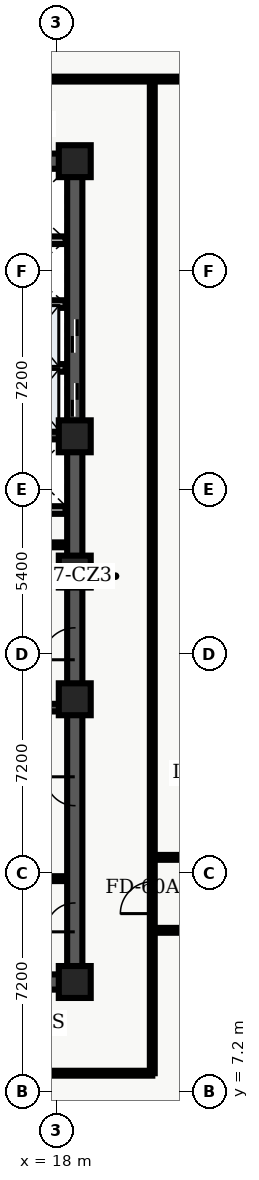
"""IFC4 building model, lengths in metres.
Left out: names, types, materials, properties, quantities, classifications, styles, units other than length and angle.
Written with IfcOpenShell. Run it as: python <this file> out.ifc"""

import sys

from ifc_helpers import new_model, entity, si_unit, converted_unit, direction, frame, origin_with_axes, origin_2d_with_axis, place, context, subcontext, project, spatial, polyline, rectangle, outline, extrude, element, fill, save


model = new_model("IFC4")
c1 = context("Model", 3, precision=1e-05, world=origin_with_axes(), true_north=direction((0.0, 1.0)))
c2 = subcontext(c1, "Body", "Model", "MODEL_VIEW")
j1 = project(units=[si_unit("LENGTHUNIT", "METRE"), converted_unit("PLANEANGLEUNIT", "DEGREE", entity("IfcPlaneAngleMeasure", 0.017), si_unit("PLANEANGLEUNIT", "RADIAN"), dimensions=[0, 0, 0, 0, 0, 0, 0])], contexts=[c1])
p1 = place(None, origin_with_axes())
s1 = spatial("IfcSite", under=j1, at=p1, CompositionType="ELEMENT")
p2 = place(p1, origin_with_axes())
s2 = spatial("IfcBuilding", under=s1, at=p2, CompositionType="ELEMENT")
p3 = place(p2, frame((0.0, 0.0, 152.4), z_axis=(0.0, 0.0, 1.0), x_axis=(1.0, 0.0, 0.0)))
s3 = spatial("IfcBuildingStorey", under=s2, at=p3, CompositionType="ELEMENT", Elevation=152.4)
p4 = place(p3, frame((11.4, 10.8, 0.0), z_axis=(0.0, 0.0, 1.0), x_axis=(1.0, 0.0, 0.0)))
e1 = element("IfcWall", 1, at=p4, inside=s3, PredefinedType="SHEAR", context=c2, shape_type="SweptSolid", body=[
    extrude(outline(polyline([(0.0, -0.25), (7.2, -0.25), (7.2, 0.25), (0.0, 0.25), (0.0, -0.25)])), origin_with_axes(), (0.0, 0.0, 1.0), 3.66),
])
p5 = place(p4, frame((2.625, 0.0, 0.0), z_axis=(0.0, 0.0, 1.0), x_axis=(1.0, 0.0, 0.0)))
e2 = element("IfcOpeningElement", 2, at=p5, cuts=e1, PredefinedType="OPENING", context=c2, shape_type="SweptSolid", body=[
    extrude(rectangle(XDim=1.05, YDim=0.52, at=origin_2d_with_axis()), origin_with_axes(), (0.0, 0.0, 1.0), 2.15),
])
p6 = place(p3, frame((11.4, 37.8, 0.0), z_axis=(0.0, 0.0, 1.0), x_axis=(1.0, 0.0, 0.0)))
e3 = element("IfcWall", 3, at=p6, inside=s3, PredefinedType="SHEAR", context=c2, shape_type="SweptSolid", body=[
    extrude(outline(polyline([(0.0, -0.25), (7.2, -0.25), (7.2, 0.25), (0.0, 0.25), (0.0, -0.25)])), origin_with_axes(), (0.0, 0.0, 1.0), 3.66),
])
p7 = place(p6, frame((2.625, 0.0, 0.0), z_axis=(0.0, 0.0, 1.0), x_axis=(1.0, 0.0, 0.0)))
e4 = element("IfcOpeningElement", 4, at=p7, cuts=e3, PredefinedType="OPENING", context=c2, shape_type="SweptSolid", body=[
    extrude(rectangle(XDim=1.05, YDim=0.52, at=origin_2d_with_axis()), origin_with_axes(), (0.0, 0.0, 1.0), 2.15),
])
p8 = place(p3, frame((18.6, 10.8, 0.0), z_axis=(0.0, 0.0, 1.0), x_axis=(0.0, 1.0, 0.0)))
e5 = element("IfcWall", 5, at=p8, inside=s3, PredefinedType="SHEAR", context=c2, shape_type="SweptSolid", body=[
    extrude(outline(polyline([(0.0, -0.25), (13.5, -0.25), (13.5, 0.25), (0.0, 0.25), (0.0, -0.25)])), origin_with_axes(), (0.0, 0.0, 1.0), 3.66),
])
p9 = place(p8, frame((11.125, 0.0, 0.0), z_axis=(0.0, 0.0, 1.0), x_axis=(1.0, 0.0, 0.0)))
e6 = element("IfcOpeningElement", 6, at=p9, cuts=e5, PredefinedType="OPENING", context=c2, shape_type="SweptSolid", body=[
    extrude(rectangle(XDim=1.05, YDim=0.52, at=origin_2d_with_axis()), origin_with_axes(), (0.0, 0.0, 1.0), 2.15),
])
p10 = place(p8, frame((2.125, 0.0, 0.0), z_axis=(0.0, 0.0, 1.0), x_axis=(1.0, 0.0, 0.0)))
e7 = element("IfcOpeningElement", 7, at=p10, cuts=e5, PredefinedType="OPENING", context=c2, shape_type="SweptSolid", body=[
    extrude(rectangle(XDim=0.95, YDim=0.52, at=origin_2d_with_axis()), origin_with_axes(), (0.0, 0.0, 1.0), 2.15),
])
p11 = place(p8, frame((6.275, 0.0, 0.0), z_axis=(0.0, 0.0, 1.0), x_axis=(1.0, 0.0, 0.0)))
e8 = element("IfcOpeningElement", 8, at=p11, cuts=e5, PredefinedType="OPENING", context=c2, shape_type="SweptSolid", body=[
    extrude(rectangle(XDim=0.95, YDim=0.52, at=origin_2d_with_axis()), origin_with_axes(), (0.0, 0.0, 1.0), 2.15),
])
p12 = place(p3, frame((18.6, 24.3, 0.0), z_axis=(0.0, 0.0, 1.0), x_axis=(0.0, 1.0, 0.0)))
e9 = element("IfcWall", 9, at=p12, inside=s3, PredefinedType="SHEAR", context=c2, shape_type="SweptSolid", body=[
    extrude(outline(polyline([(0.0, -0.25), (13.5, -0.25), (13.5, 0.25), (0.0, 0.25), (0.0, -0.25)])), origin_with_axes(), (0.0, 0.0, 1.0), 3.66),
])
p13 = place(p12, frame((5.65, 0.0, 0.0), z_axis=(0.0, 0.0, 1.0), x_axis=(1.0, 0.0, 0.0)))
e10 = element("IfcOpeningElement", 10, at=p13, cuts=e9, PredefinedType="OPENING", context=c2, shape_type="SweptSolid", body=[
    extrude(rectangle(XDim=1.1, YDim=0.52, at=origin_2d_with_axis()), origin_with_axes(), (0.0, 0.0, 1.0), 2.15),
])
p14 = place(p12, frame((7.75, 0.0, 0.0), z_axis=(0.0, 0.0, 1.0), x_axis=(1.0, 0.0, 0.0)))
e11 = element("IfcOpeningElement", 11, at=p14, cuts=e9, PredefinedType="OPENING", context=c2, shape_type="SweptSolid", body=[
    extrude(rectangle(XDim=1.1, YDim=0.52, at=origin_2d_with_axis()), origin_with_axes(), (0.0, 0.0, 1.0), 2.15),
])
for number, where, z_axis, x_axis in (
    (12, (11.65, 19.825, 0.0), (0.0, 0.0, 1.0), (1.0, 0.0, 0.0)),
    (13, (11.65, 28.775, 0.0), (0.0, 0.0, 1.0), (1.0, 0.0, 0.0)),
):
    element("IfcWall", number, at=place(p3, frame(where, z_axis=z_axis, x_axis=x_axis)), inside=s3, PredefinedType="SHEAR", context=c2, shape_type="SweptSolid", body=[
        extrude(outline(polyline([(0.0, -0.125), (6.7, -0.125), (6.7, 0.125), (0.0, 0.125), (0.0, -0.125)])), origin_with_axes(), (0.0, 0.0, 1.0), 3.66),
    ])
p15 = place(p3, frame((11.7, 24.1, 0.0), z_axis=(0.0, 0.0, 1.0), x_axis=(1.0, 0.0, 0.0)))
e14 = element("IfcWall", 14, at=p15, inside=s3, PredefinedType="SOLIDWALL", context=c2, shape_type="SweptSolid", body=[
    extrude(outline(polyline([(0.0, -0.125), (6.6, -0.125), (6.6, 0.125), (0.0, 0.125), (0.0, -0.125)])), origin_with_axes(), (0.0, 0.0, 1.0), 2.7),
])
p16 = place(p15, frame((3.75, 0.0, 0.0), z_axis=(0.0, 0.0, 1.0), x_axis=(1.0, 0.0, 0.0)))
e15 = element("IfcOpeningElement", 15, at=p16, cuts=e14, PredefinedType="OPENING", context=c2, shape_type="SweptSolid", body=[
    extrude(rectangle(XDim=0.9, YDim=0.27, at=origin_2d_with_axis()), origin_with_axes(), (0.0, 0.0, 1.0), 2.15),
])
p17 = place(p3, frame((11.7, 26.325, 0.0), z_axis=(0.0, 0.0, 1.0), x_axis=(1.0, 0.0, 0.0)))
e16 = element("IfcWall", 16, at=p17, inside=s3, PredefinedType="SOLIDWALL", context=c2, shape_type="SweptSolid", body=[
    extrude(outline(polyline([(0.0, -0.125), (6.6, -0.125), (6.6, 0.125), (0.0, 0.125), (0.0, -0.125)])), origin_with_axes(), (0.0, 0.0, 1.0), 2.7),
])
p18 = place(p17, frame((3.5, 0.0, 0.0), z_axis=(0.0, 0.0, 1.0), x_axis=(1.0, 0.0, 0.0)))
e17 = element("IfcOpeningElement", 17, at=p18, cuts=e16, PredefinedType="OPENING", context=c2, shape_type="SweptSolid", body=[
    extrude(rectangle(XDim=0.9, YDim=0.27, at=origin_2d_with_axis()), origin_with_axes(), (0.0, 0.0, 1.0), 2.15),
])
for number, where, z_axis, x_axis in (
    (18, (18.6, 10.8, 0.0), (0.0, 0.0, 1.0), (1.0, 0.0, 0.0)),
    (19, (18.6, 20.1, 0.0), (0.0, 0.0, 1.0), (1.0, 0.0, 0.0)),
    (20, (18.6, 24.3, 0.0), (0.0, 0.0, 1.0), (1.0, 0.0, 0.0)),
    (21, (18.6, 28.75, 0.0), (0.0, 0.0, 1.0), (1.0, 0.0, 0.0)),
    (22, (18.6, 37.8, 0.0), (0.0, 0.0, 1.0), (1.0, 0.0, 0.0)),
):
    element("IfcColumn", number, at=place(p3, frame(where, z_axis=z_axis, x_axis=x_axis)), inside=s3, PredefinedType="COLUMN", context=c2, shape_type="SweptSolid", body=[
        extrude(rectangle(XDim=1.05, YDim=1.05, at=origin_2d_with_axis()), origin_with_axes(), (0.0, 0.0, 1.0), 3.9),
    ])
p19 = place(p3, frame((14.62, 25.18, 0.0), z_axis=(0.0, 0.0, 1.0), x_axis=(1.0, 0.0, 0.0)))
e23 = element("IfcWall", 23, at=p19, inside=s3, PredefinedType="PARTITIONING", context=c2, shape_type="SweptSolid", body=[
    extrude(outline(polyline([(0.0, -0.08), (3.68, -0.08), (3.68, 0.08), (0.0, 0.08), (0.0, -0.08)])), origin_with_axes(), (0.0, 0.0, 1.0), 2.7),
])
p20 = place(p19, frame((1.95, 0.0, 0.0), z_axis=(0.0, 0.0, 1.0), x_axis=(1.0, 0.0, 0.0)))
e24 = element("IfcOpeningElement", 24, at=p20, cuts=e23, PredefinedType="OPENING", context=c2, shape_type="SweptSolid", body=[
    extrude(rectangle(XDim=0.9, YDim=0.18, at=origin_2d_with_axis()), origin_with_axes(), (0.0, 0.0, 1.0), 2.15),
])
p21 = place(p3, frame((15.84, 14.2, 0.0), z_axis=(0.0, 0.0, 1.0), x_axis=(1.0, 0.0, 0.0)))
e25 = element("IfcWall", 25, at=p21, inside=s3, PredefinedType="PARTITIONING", context=c2, shape_type="SweptSolid", body=[
    extrude(outline(polyline([(0.0, -0.08), (2.46, -0.08), (2.46, 0.08), (0.0, 0.08), (0.0, -0.08)])), origin_with_axes(), (0.0, 0.0, 1.0), 2.7),
])
for number, where, z_axis, x_axis in (
    (26, (15.84, 31.0, 0.0), (0.0, 0.0, 1.0), (1.0, 0.0, 0.0)),
    (27, (15.84, 33.1, 0.0), (0.0, 0.0, 1.0), (1.0, 0.0, 0.0)),
    (28, (15.84, 35.2, 0.0), (0.0, 0.0, 1.0), (1.0, 0.0, 0.0)),
):
    element("IfcWall", number, at=place(p3, frame(where, z_axis=z_axis, x_axis=x_axis)), inside=s3, PredefinedType="SOLIDWALL", context=c2, shape_type="SweptSolid", body=[
        extrude(outline(polyline([(0.0, -0.125), (2.46, -0.125), (2.46, 0.125), (0.0, 0.125), (0.0, -0.125)])), origin_with_axes(), (0.0, 0.0, 1.0), 2.7),
    ])
p22 = place(p3, frame((2.6, 7.8, 0.0), z_axis=(0.0, 0.0, 1.0), x_axis=(1.0, 0.0, 0.0)))
e29 = element("IfcWall", 29, at=p22, inside=s3, PredefinedType="PARTITIONING", context=c2, shape_type="SweptSolid", body=[
    extrude(outline(polyline([(0.0, -0.08), (18.55, -0.08), (18.55, 0.08), (0.0, 0.08), (0.0, -0.08)])), origin_with_axes(), (0.0, 0.0, 1.0), 2.7),
])
p23 = place(p22, frame((3.787, 0.0, 0.0), z_axis=(0.0, 0.0, 1.0), x_axis=(1.0, 0.0, 0.0)))
e30 = element("IfcOpeningElement", 30, at=p23, cuts=e29, PredefinedType="OPENING", context=c2, shape_type="SweptSolid", body=[
    extrude(rectangle(XDim=1.0, YDim=0.18, at=origin_2d_with_axis()), origin_with_axes(), (0.0, 0.0, 1.0), 2.15),
])
p24 = place(p22, frame((13.322, 0.0, 0.0), z_axis=(0.0, 0.0, 1.0), x_axis=(1.0, 0.0, 0.0)))
e31 = element("IfcOpeningElement", 31, at=p24, cuts=e29, PredefinedType="OPENING", context=c2, shape_type="SweptSolid", body=[
    extrude(rectangle(XDim=1.0, YDim=0.18, at=origin_2d_with_axis()), origin_with_axes(), (0.0, 0.0, 1.0), 2.15),
])
p25 = place(p3, frame((2.6, 40.5, 0.0), z_axis=(0.0, 0.0, 1.0), x_axis=(1.0, 0.0, 0.0)))
e32 = element("IfcWall", 32, at=p25, inside=s3, PredefinedType="PARTITIONING", context=c2, shape_type="SweptSolid", body=[
    extrude(outline(polyline([(0.0, -0.08), (19.792, -0.08), (19.792, 0.08), (0.0, 0.08), (0.0, -0.08)])), origin_with_axes(), (0.0, 0.0, 1.0), 2.7),
])
p26 = place(p25, frame((2.174, 0.0, 0.0), z_axis=(0.0, 0.0, 1.0), x_axis=(1.0, 0.0, 0.0)))
e33 = element("IfcOpeningElement", 33, at=p26, cuts=e32, PredefinedType="OPENING", context=c2, shape_type="SweptSolid", body=[
    extrude(rectangle(XDim=1.0, YDim=0.18, at=origin_2d_with_axis()), origin_with_axes(), (0.0, 0.0, 1.0), 2.15),
])
p27 = place(p25, frame((7.699, 0.0, 0.0), z_axis=(0.0, 0.0, 1.0), x_axis=(1.0, 0.0, 0.0)))
e34 = element("IfcOpeningElement", 34, at=p27, cuts=e32, PredefinedType="OPENING", context=c2, shape_type="SweptSolid", body=[
    extrude(rectangle(XDim=1.0, YDim=0.18, at=origin_2d_with_axis()), origin_with_axes(), (0.0, 0.0, 1.0), 2.15),
])
p28 = place(p25, frame((10.601, 0.0, 0.0), z_axis=(0.0, 0.0, 1.0), x_axis=(1.0, 0.0, 0.0)))
e35 = element("IfcOpeningElement", 35, at=p28, cuts=e32, PredefinedType="OPENING", context=c2, shape_type="SweptSolid", body=[
    extrude(rectangle(XDim=1.0, YDim=0.18, at=origin_2d_with_axis()), origin_with_axes(), (0.0, 0.0, 1.0), 2.15),
])
p29 = place(p25, frame((14.499, 0.0, 0.0), z_axis=(0.0, 0.0, 1.0), x_axis=(1.0, 0.0, 0.0)))
e36 = element("IfcOpeningElement", 36, at=p29, cuts=e32, PredefinedType="OPENING", context=c2, shape_type="SweptSolid", body=[
    extrude(rectangle(XDim=1.0, YDim=0.18, at=origin_2d_with_axis()), origin_with_axes(), (0.0, 0.0, 1.0), 2.15),
])
p30 = place(p3, frame((21.15, 7.8, 0.0), z_axis=(0.0, 0.0, 1.0), x_axis=(0.0, 1.0, 0.0)))
e37 = element("IfcWall", 37, at=p30, inside=s3, PredefinedType="PARTITIONING", context=c2, shape_type="SweptSolid", body=[
    extrude(outline(polyline([(0.0, -0.08), (32.7, -0.08), (32.7, 0.08), (0.0, 0.08), (0.0, -0.08)])), origin_with_axes(), (0.0, 0.0, 1.0), 2.7),
])
p31 = place(p30, frame((5.775, 0.0, 0.0), z_axis=(0.0, 0.0, 1.0), x_axis=(1.0, 0.0, 0.0)))
e38 = element("IfcOpeningElement", 38, at=p31, cuts=e37, PredefinedType="OPENING", context=c2, shape_type="SweptSolid", body=[
    extrude(rectangle(XDim=1.05, YDim=0.18, at=origin_2d_with_axis()), origin_with_axes(), (0.0, 0.0, 1.0), 2.15),
])
p32 = place(p3, frame((21.15, 12.5, 0.0), z_axis=(0.0, 0.0, 1.0), x_axis=(1.0, 0.0, 0.0)))
e39 = element("IfcWall", 39, at=p32, inside=s3, PredefinedType="PARTITIONING", context=c2, shape_type="SweptSolid", body=[
    extrude(outline(polyline([(0.0, -0.08), (15.2, -0.08), (15.2, 0.08), (0.0, 0.08), (0.0, -0.08)])), origin_with_axes(), (0.0, 0.0, 1.0), 2.7),
])
p33 = place(p32, frame((2.313, 0.0, 0.0), z_axis=(0.0, 0.0, 1.0), x_axis=(1.0, 0.0, 0.0)))
e40 = element("IfcOpeningElement", 40, at=p33, cuts=e39, PredefinedType="OPENING", context=c2, shape_type="SweptSolid", body=[
    extrude(rectangle(XDim=1.0, YDim=0.18, at=origin_2d_with_axis()), origin_with_axes(), (0.0, 0.0, 1.0), 2.15),
])
p34 = place(p32, frame((6.912, 0.0, 0.0), z_axis=(0.0, 0.0, 1.0), x_axis=(1.0, 0.0, 0.0)))
e41 = element("IfcOpeningElement", 41, at=p34, cuts=e39, PredefinedType="OPENING", context=c2, shape_type="SweptSolid", body=[
    extrude(rectangle(XDim=1.0, YDim=0.18, at=origin_2d_with_axis()), origin_with_axes(), (0.0, 0.0, 1.0), 2.15),
])
p35 = place(p32, frame((12.248, 0.0, 0.0), z_axis=(0.0, 0.0, 1.0), x_axis=(1.0, 0.0, 0.0)))
e42 = element("IfcOpeningElement", 42, at=p35, cuts=e39, PredefinedType="OPENING", context=c2, shape_type="SweptSolid", body=[
    extrude(rectangle(XDim=1.2, YDim=0.18, at=origin_2d_with_axis()), origin_with_axes(), (0.0, 0.0, 1.0), 2.2),
])
p36 = place(p3, frame((21.15, 14.9, 0.0), z_axis=(0.0, 0.0, 1.0), x_axis=(1.0, 0.0, 0.0)))
e43 = element("IfcWall", 43, at=p36, inside=s3, PredefinedType="PARTITIONING", context=c2, shape_type="SweptSolid", body=[
    extrude(outline(polyline([(0.0, -0.08), (15.2, -0.08), (15.2, 0.08), (0.0, 0.08), (0.0, -0.08)])), origin_with_axes(), (0.0, 0.0, 1.0), 2.7),
])
p37 = place(p36, frame((3.47, 0.0, 0.0), z_axis=(0.0, 0.0, 1.0), x_axis=(1.0, 0.0, 0.0)))
e44 = element("IfcOpeningElement", 44, at=p37, cuts=e43, PredefinedType="OPENING", context=c2, shape_type="SweptSolid", body=[
    extrude(rectangle(XDim=1.0, YDim=0.18, at=origin_2d_with_axis()), origin_with_axes(), (0.0, 0.0, 1.0), 2.15),
])
p38 = place(p36, frame((10.94, 0.0, 0.0), z_axis=(0.0, 0.0, 1.0), x_axis=(1.0, 0.0, 0.0)))
e45 = element("IfcOpeningElement", 45, at=p38, cuts=e43, PredefinedType="OPENING", context=c2, shape_type="SweptSolid", body=[
    extrude(rectangle(XDim=1.0, YDim=0.18, at=origin_2d_with_axis()), origin_with_axes(), (0.0, 0.0, 1.0), 2.15),
])
p39 = place(p12, frame((5.65, 0.0, 0.0), z_axis=(0.0, 0.0, 1.0), x_axis=(1.0, 0.0, 0.0)))
e46 = element("IfcDoor", 46, at=p39, inside=s3, OperationType="SLIDING_TO_LEFT", PredefinedType="DOOR", context=c2, shape_type="SweptSolid", body=[
    extrude(rectangle(XDim=1.1, YDim=0.09, at=origin_2d_with_axis()), origin_with_axes(), (0.0, 0.0, 1.0), 2.15),
])
fill(e10, e46)
p40 = place(p12, frame((7.75, 0.0, 0.0), z_axis=(0.0, 0.0, 1.0), x_axis=(1.0, 0.0, 0.0)))
e47 = element("IfcDoor", 47, at=p40, inside=s3, OperationType="SLIDING_TO_RIGHT", PredefinedType="DOOR", context=c2, shape_type="SweptSolid", body=[
    extrude(rectangle(XDim=1.1, YDim=0.09, at=origin_2d_with_axis()), origin_with_axes(), (0.0, 0.0, 1.0), 2.15),
])
fill(e11, e47)
p41 = place(p8, frame((11.125, 0.0, 0.0), z_axis=(0.0, 0.0, 1.0), x_axis=(1.0, 0.0, 0.0)))
e48 = element("IfcDoor", 48, at=p41, inside=s3, OperationType="SINGLE_SWING_LEFT", PredefinedType="DOOR", context=c2, shape_type="SweptSolid", body=[
    extrude(rectangle(XDim=1.05, YDim=0.09, at=origin_2d_with_axis()), origin_with_axes(), (0.0, 0.0, 1.0), 2.15),
])
fill(e6, e48)
p42 = place(p8, frame((2.125, 0.0, 0.0), z_axis=(0.0, 0.0, 1.0), x_axis=(1.0, 0.0, 0.0)))
e49 = element("IfcDoor", 49, at=p42, inside=s3, OperationType="SINGLE_SWING_LEFT", PredefinedType="DOOR", context=c2, shape_type="SweptSolid", body=[
    extrude(rectangle(XDim=0.95, YDim=0.09, at=origin_2d_with_axis()), origin_with_axes(), (0.0, 0.0, 1.0), 2.15),
])
fill(e7, e49)
p43 = place(p8, frame((6.275, 0.0, 0.0), z_axis=(0.0, 0.0, 1.0), x_axis=(1.0, 0.0, 0.0)))
e50 = element("IfcDoor", 50, at=p43, inside=s3, OperationType="SINGLE_SWING_RIGHT", PredefinedType="DOOR", context=c2, shape_type="SweptSolid", body=[
    extrude(rectangle(XDim=0.95, YDim=0.09, at=origin_2d_with_axis()), origin_with_axes(), (0.0, 0.0, 1.0), 2.15),
])
fill(e8, e50)
p44 = place(p30, frame((5.775, 0.0, 0.0), z_axis=(0.0, 0.0, 1.0), x_axis=(1.0, 0.0, 0.0)))
e51 = element("IfcDoor", 51, at=p44, inside=s3, OperationType="SINGLE_SWING_LEFT", PredefinedType="DOOR", context=c2, shape_type="SweptSolid", body=[
    extrude(rectangle(XDim=1.05, YDim=0.09, at=origin_2d_with_axis()), origin_with_axes(), (0.0, 0.0, 1.0), 2.15),
])
fill(e38, e51)
save(model, sys.argv[1])
